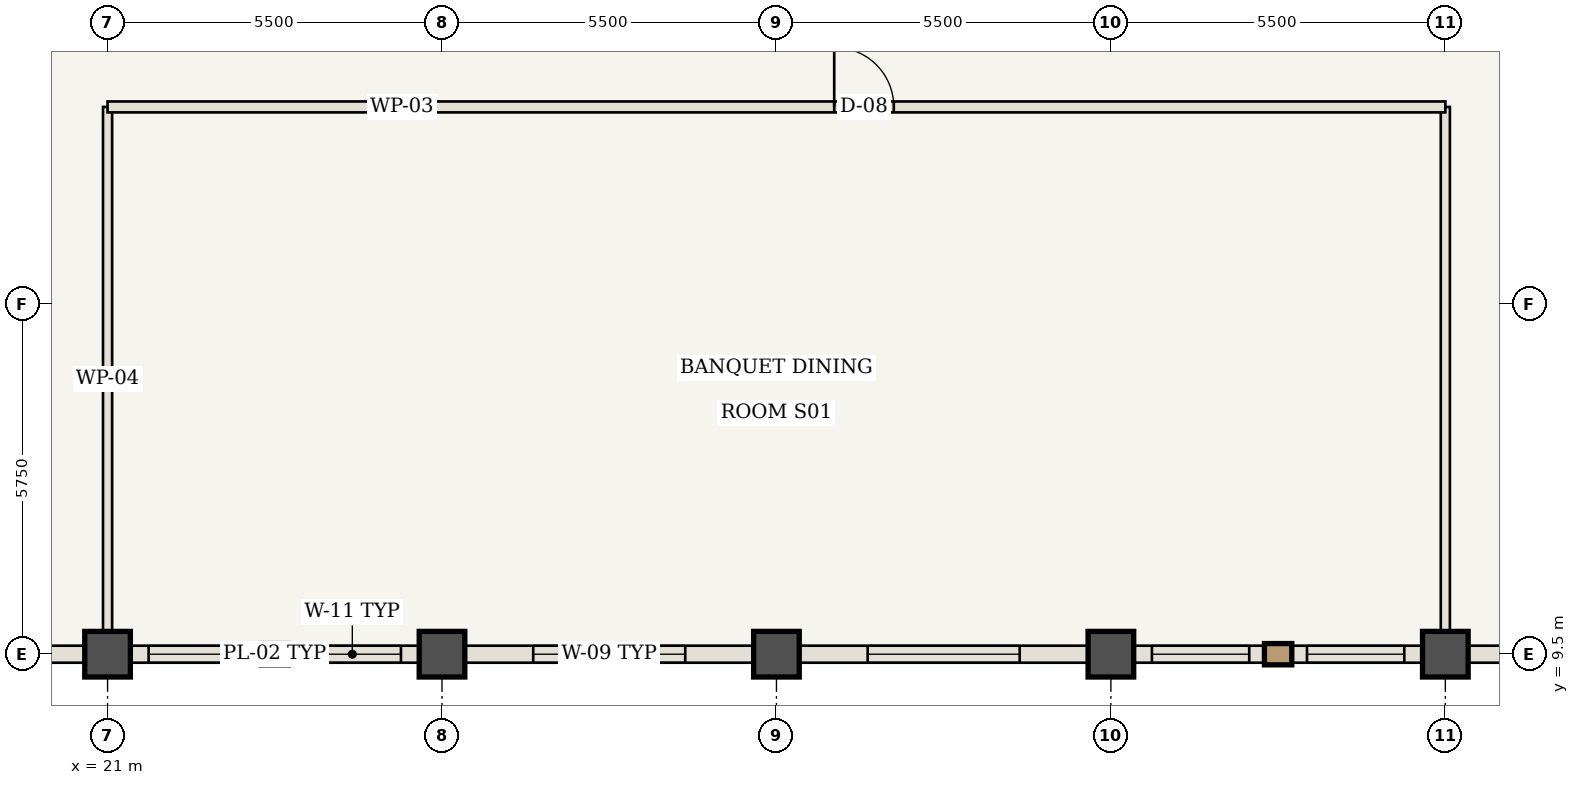
"""IFC4 building model, lengths in metres.
Left out: names, types, materials, properties, quantities, classifications, styles, units other than length and angle.
Written with IfcOpenShell. Run it as: python <this file> out.ifc"""

import sys

from ifc_helpers import new_model, si_unit, direction, frame, frame_2d, origin, origin_2d, place, context, subcontext, project, spatial, rectangle, extrude, element, fill, save


model = new_model("IFC4")
c1 = context("Model", 3, precision=1e-05, world=origin(), true_north=direction((0.0, 1.0)))
c2 = subcontext(c1, "Body", "Model", "MODEL_VIEW")
j1 = project(units=[si_unit("LENGTHUNIT", "METRE"), si_unit("PLANEANGLEUNIT", "RADIAN")], contexts=[c1])
p1 = place(None, origin())
s1 = spatial("IfcSite", under=j1, at=p1, CompositionType="ELEMENT")
p2 = place(p1, origin())
s2 = spatial("IfcBuilding", under=s1, at=p2, CompositionType="ELEMENT")
p3 = place(p2, frame((0.0, 0.0, 304.5)))
s3 = spatial("IfcBuildingStorey", under=s2, at=p3, CompositionType="ELEMENT", Elevation=304.5)
for number, where, z_axis, x_axis in (
    (1, (21.0, 9.5, 0.0), (0.0, 0.0, 1.0), (1.0, 0.0, 0.0)),
    (2, (26.5, 9.5, 0.0), (0.0, 0.0, 1.0), (1.0, 0.0, 0.0)),
    (3, (32.0, 9.5, 0.0), (0.0, 0.0, 1.0), (1.0, 0.0, 0.0)),
    (4, (37.5, 9.5, 0.0), (0.0, 0.0, 1.0), (1.0, 0.0, 0.0)),
    (5, (43.0, 9.5, 0.0), (0.0, 0.0, 1.0), (1.0, 0.0, 0.0)),
):
    element("IfcColumn", number, at=place(p3, frame(where, z_axis=z_axis, x_axis=x_axis)), inside=s3, PredefinedType="COLUMN", context=c2, shape_type="SweptSolid", body=[
        extrude(rectangle(XDim=0.75, YDim=0.75, at=origin_2d()), origin(), (0.0, 0.0, 1.0), 3.85),
    ])
for number, where, z_axis, x_axis in (
    (6, (21.0, 9.56, 0.0), (0.0, 0.0, 1.0), (0.0, 1.0, 0.0)),
    (7, (43.0, 9.56, 0.0), (0.0, 0.0, 1.0), (0.0, 1.0, 0.0)),
):
    element("IfcWall", number, at=place(p3, frame(where, z_axis=z_axis, x_axis=x_axis)), inside=s3, PredefinedType="STANDARD", context=c2, shape_type="SweptSolid", body=[
        extrude(rectangle(XDim=8.94, YDim=0.15, at=frame_2d((4.47, 0.0))), origin(), (0.0, 0.0, 1.0), 3.63),
    ])
p4 = place(p3, frame((21.0, 18.5, 0.0), z_axis=(0.0, 0.0, 1.0), x_axis=(1.0, 0.0, 0.0)))
e8 = element("IfcWall", 8, at=p4, inside=s3, PredefinedType="STANDARD", context=c2, shape_type="SweptSolid", body=[
    extrude(rectangle(XDim=22.0, YDim=0.18, at=frame_2d((11.0, 0.0))), origin(), (0.0, 0.0, 1.0), 3.63),
])
p5 = place(p4, frame((11.95, 0.0, 0.0)))
e9 = element("IfcOpeningElement", 9, at=p5, cuts=e8, PredefinedType="OPENING", context=c2, shape_type="SweptSolid", body=[
    extrude(rectangle(XDim=0.98, YDim=2.2, at=frame_2d((0.49, 1.1))), frame((0.0, 0.1, 0.0), z_axis=(0.0, -1.0, 0.0), x_axis=(1.0, 0.0, 0.0)), (0.0, 0.0, 1.0), 0.2),
])
p6 = place(p3, frame((21.0, 9.5, 0.0), z_axis=(0.0, 0.0, 1.0), x_axis=(-1.0, 0.0, 0.0)))
e10 = element("IfcWall", 10, at=p6, inside=s3, PredefinedType="USERDEFINED", context=c2, shape_type="SweptSolid", body=[
    extrude(rectangle(XDim=5.5, YDim=0.28, at=frame_2d((2.75, 0.0))), origin(), (0.0, 0.0, 1.0), 2.93),
])
p7 = place(p3, frame((26.5, 9.5, 0.0), z_axis=(0.0, 0.0, 1.0), x_axis=(-1.0, 0.0, 0.0)))
e11 = element("IfcWall", 11, at=p7, inside=s3, PredefinedType="USERDEFINED", context=c2, shape_type="SweptSolid", body=[
    extrude(rectangle(XDim=5.5, YDim=0.28, at=frame_2d((2.75, 0.0))), origin(), (0.0, 0.0, 1.0), 2.93),
])
p8 = place(p7, frame((0.675, 0.0, 0.85)))
e12 = element("IfcOpeningElement", 12, at=p8, cuts=e11, PredefinedType="OPENING", context=c2, shape_type="SweptSolid", body=[
    extrude(rectangle(XDim=1.6, YDim=1.88, at=frame_2d((0.8, 0.94))), frame((0.0, 0.15, 0.0), z_axis=(0.0, -1.0, 0.0), x_axis=(1.0, 0.0, 0.0)), (0.0, 0.0, 1.0), 0.3),
])
p9 = place(p7, frame((3.225, 0.0, 0.85)))
e13 = element("IfcOpeningElement", 13, at=p9, cuts=e11, PredefinedType="OPENING", context=c2, shape_type="SweptSolid", body=[
    extrude(rectangle(XDim=1.6, YDim=1.88, at=frame_2d((0.8, 0.94))), frame((0.0, 0.15, 0.0), z_axis=(0.0, -1.0, 0.0), x_axis=(1.0, 0.0, 0.0)), (0.0, 0.0, 1.0), 0.3),
])
p10 = place(p3, frame((32.0, 9.5, 0.0), z_axis=(0.0, 0.0, 1.0), x_axis=(-1.0, 0.0, 0.0)))
e14 = element("IfcWall", 14, at=p10, inside=s3, PredefinedType="USERDEFINED", context=c2, shape_type="SweptSolid", body=[
    extrude(rectangle(XDim=5.5, YDim=0.28, at=frame_2d((2.75, 0.0))), origin(), (0.0, 0.0, 1.0), 2.93),
])
p11 = place(p10, frame((1.5, 0.0, 0.85)))
e15 = element("IfcOpeningElement", 15, at=p11, cuts=e14, PredefinedType="OPENING", context=c2, shape_type="SweptSolid", body=[
    extrude(rectangle(XDim=2.5, YDim=1.88, at=frame_2d((1.25, 0.94))), frame((0.0, 0.15, 0.0), z_axis=(0.0, -1.0, 0.0), x_axis=(1.0, 0.0, 0.0)), (0.0, 0.0, 1.0), 0.3),
])
p12 = place(p3, frame((37.5, 9.5, 0.0), z_axis=(0.0, 0.0, 1.0), x_axis=(-1.0, 0.0, 0.0)))
e16 = element("IfcWall", 16, at=p12, inside=s3, PredefinedType="USERDEFINED", context=c2, shape_type="SweptSolid", body=[
    extrude(rectangle(XDim=5.5, YDim=0.28, at=frame_2d((2.75, 0.0))), origin(), (0.0, 0.0, 1.0), 2.93),
])
p13 = place(p12, frame((1.5, 0.0, 0.85)))
e17 = element("IfcOpeningElement", 17, at=p13, cuts=e16, PredefinedType="OPENING", context=c2, shape_type="SweptSolid", body=[
    extrude(rectangle(XDim=2.5, YDim=1.88, at=frame_2d((1.25, 0.94))), frame((0.0, 0.15, 0.0), z_axis=(0.0, -1.0, 0.0), x_axis=(1.0, 0.0, 0.0)), (0.0, 0.0, 1.0), 0.3),
])
p14 = place(p3, frame((43.0, 9.5, 0.0), z_axis=(0.0, 0.0, 1.0), x_axis=(-1.0, 0.0, 0.0)))
e18 = element("IfcWall", 18, at=p14, inside=s3, PredefinedType="USERDEFINED", context=c2, shape_type="SweptSolid", body=[
    extrude(rectangle(XDim=5.5, YDim=0.28, at=frame_2d((2.75, 0.0))), origin(), (0.0, 0.0, 1.0), 2.93),
])
p15 = place(p14, frame((0.675, 0.0, 0.85)))
e19 = element("IfcOpeningElement", 19, at=p15, cuts=e18, PredefinedType="OPENING", context=c2, shape_type="SweptSolid", body=[
    extrude(rectangle(XDim=1.6, YDim=1.88, at=frame_2d((0.8, 0.94))), frame((0.0, 0.15, 0.0), z_axis=(0.0, -1.0, 0.0), x_axis=(1.0, 0.0, 0.0)), (0.0, 0.0, 1.0), 0.3),
])
p16 = place(p14, frame((3.225, 0.0, 0.85)))
e20 = element("IfcOpeningElement", 20, at=p16, cuts=e18, PredefinedType="OPENING", context=c2, shape_type="SweptSolid", body=[
    extrude(rectangle(XDim=1.6, YDim=1.88, at=frame_2d((0.8, 0.94))), frame((0.0, 0.15, 0.0), z_axis=(0.0, -1.0, 0.0), x_axis=(1.0, 0.0, 0.0)), (0.0, 0.0, 1.0), 0.3),
])
p17 = place(p3, frame((48.5, 9.5, 0.0), z_axis=(0.0, 0.0, 1.0), x_axis=(-1.0, 0.0, 0.0)))
e21 = element("IfcWall", 21, at=p17, inside=s3, PredefinedType="USERDEFINED", context=c2, shape_type="SweptSolid", body=[
    extrude(rectangle(XDim=5.5, YDim=0.28, at=frame_2d((2.75, 0.0))), origin(), (0.0, 0.0, 1.0), 2.93),
])
p18 = place(p5, origin())
e22 = element("IfcDoor", 22, at=p18, inside=s3, OperationType="SINGLE_SWING_LEFT", PredefinedType="DOOR", context=c2, shape_type="SweptSolid", body=[
    extrude(rectangle(XDim=0.98, YDim=2.2, at=frame_2d((0.49, 1.1))), frame((0.0, 0.025, 0.0), z_axis=(0.0, -1.0, 0.0), x_axis=(1.0, 0.0, 0.0)), (0.0, 0.0, 1.0), 0.05),
])
fill(e9, e22)
p19 = place(p8, origin())
e23 = element("IfcWindow", 23, at=p19, inside=s3, PartitioningType="SINGLE_PANEL", PredefinedType="WINDOW", context=c2, shape_type="SweptSolid", body=[
    extrude(rectangle(XDim=1.6, YDim=1.88, at=frame_2d((0.8, 0.94))), frame((0.0, 0.03, 0.0), z_axis=(0.0, -1.0, 0.0), x_axis=(1.0, 0.0, 0.0)), (0.0, 0.0, 1.0), 0.06),
])
fill(e12, e23)
p20 = place(p9, origin())
e24 = element("IfcWindow", 24, at=p20, inside=s3, PartitioningType="SINGLE_PANEL", PredefinedType="WINDOW", context=c2, shape_type="SweptSolid", body=[
    extrude(rectangle(XDim=1.6, YDim=1.88, at=frame_2d((0.8, 0.94))), frame((0.0, 0.03, 0.0), z_axis=(0.0, -1.0, 0.0), x_axis=(1.0, 0.0, 0.0)), (0.0, 0.0, 1.0), 0.06),
])
fill(e13, e24)
p21 = place(p11, origin())
e25 = element("IfcWindow", 25, at=p21, inside=s3, PartitioningType="SINGLE_PANEL", PredefinedType="WINDOW", context=c2, shape_type="SweptSolid", body=[
    extrude(rectangle(XDim=2.5, YDim=1.88, at=frame_2d((1.25, 0.94))), frame((0.0, 0.03, 0.0), z_axis=(0.0, -1.0, 0.0), x_axis=(1.0, 0.0, 0.0)), (0.0, 0.0, 1.0), 0.06),
])
fill(e15, e25)
p22 = place(p13, origin())
e26 = element("IfcWindow", 26, at=p22, inside=s3, PartitioningType="SINGLE_PANEL", PredefinedType="WINDOW", context=c2, shape_type="SweptSolid", body=[
    extrude(rectangle(XDim=2.5, YDim=1.88, at=frame_2d((1.25, 0.94))), frame((0.0, 0.03, 0.0), z_axis=(0.0, -1.0, 0.0), x_axis=(1.0, 0.0, 0.0)), (0.0, 0.0, 1.0), 0.06),
])
fill(e17, e26)
p23 = place(p15, origin())
e27 = element("IfcWindow", 27, at=p23, inside=s3, PartitioningType="SINGLE_PANEL", PredefinedType="WINDOW", context=c2, shape_type="SweptSolid", body=[
    extrude(rectangle(XDim=1.6, YDim=1.88, at=frame_2d((0.8, 0.94))), frame((0.0, 0.03, 0.0), z_axis=(0.0, -1.0, 0.0), x_axis=(1.0, 0.0, 0.0)), (0.0, 0.0, 1.0), 0.06),
])
fill(e19, e27)
p24 = place(p16, origin())
e28 = element("IfcWindow", 28, at=p24, inside=s3, PartitioningType="SINGLE_PANEL", PredefinedType="WINDOW", context=c2, shape_type="SweptSolid", body=[
    extrude(rectangle(XDim=1.6, YDim=1.88, at=frame_2d((0.8, 0.94))), frame((0.0, 0.03, 0.0), z_axis=(0.0, -1.0, 0.0), x_axis=(1.0, 0.0, 0.0)), (0.0, 0.0, 1.0), 0.06),
])
fill(e20, e28)
save(model, sys.argv[1])
